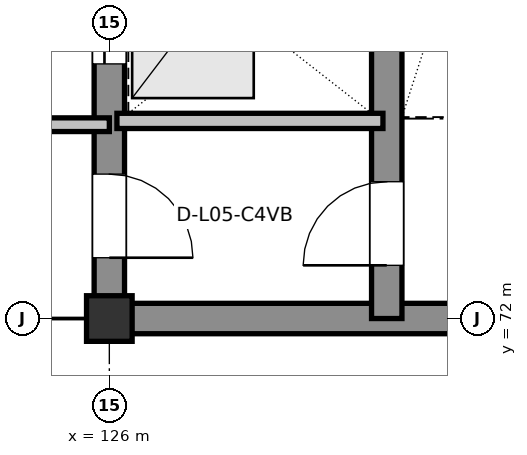
"""IFC4 building model, lengths in metres.
Left out: names, types, materials, properties, quantities, classifications, styles, units other than length and angle.
Written with IfcOpenShell. Run it as: python <this file> out.ifc"""

import sys

from ifc_helpers import new_model, si_unit, direction, frame, frame_2d, origin, origin_2d, place, context, subcontext, project, spatial, rectangle, extrude, element, fill, save


model = new_model("IFC4")
c1 = context("Model", 3, precision=1e-05, world=origin(), true_north=direction((0.0, 1.0)))
c2 = subcontext(c1, "Body", "Model", "MODEL_VIEW")
j1 = project(units=[si_unit("LENGTHUNIT", "METRE"), si_unit("PLANEANGLEUNIT", "RADIAN")], contexts=[c1])
p1 = place(None, origin())
s1 = spatial("IfcSite", under=j1, at=p1, CompositionType="ELEMENT")
p2 = place(p1, origin())
s2 = spatial("IfcBuilding", under=s1, at=p2, CompositionType="ELEMENT")
p3 = place(p2, frame((0.0, 0.0, 23.4)))
s3 = spatial("IfcBuildingStorey", under=s2, at=p3, CompositionType="ELEMENT", Elevation=23.4)
p4 = place(p3, frame((126.0, 72.0, 0.0), z_axis=(0.0, 0.0, 1.0), x_axis=(1.0, 0.0, 0.0)))
e1 = element("IfcColumn", 1, at=p4, inside=s3, PredefinedType="COLUMN", context=c2, shape_type="SweptSolid", body=[
    extrude(rectangle(XDim=0.6, YDim=0.6, at=origin_2d()), origin(), (0.0, 0.0, 1.0), 4.2),
])
p5 = place(p3, frame((126.0, 72.0, 0.0), z_axis=(0.0, 0.0, 1.0), x_axis=(1.0, 0.0, 0.0)))
e2 = element("IfcWall", 2, at=p5, inside=s3, PredefinedType="SHEAR", context=c2, shape_type="SweptSolid", body=[
    extrude(rectangle(XDim=9.0, YDim=0.4, at=frame_2d((4.5, 0.0))), origin(), (0.0, 0.0, 1.0), 3.96),
])
p6 = place(p3, frame((126.0, 90.0, 0.0), z_axis=(0.0, 0.0, 1.0), x_axis=(0.0, -1.0, 0.0)))
e3 = element("IfcWall", 3, at=p6, inside=s3, PredefinedType="SHEAR", context=c2, shape_type="SweptSolid", body=[
    extrude(rectangle(XDim=18.0, YDim=0.4, at=frame_2d((9.0, 0.0))), origin(), (0.0, 0.0, 1.0), 3.96),
])
p7 = place(p6, frame((16.1, 0.0, 0.0)))
e4 = element("IfcOpeningElement", 4, at=p7, cuts=e3, PredefinedType="OPENING", context=c2, shape_type="SweptSolid", body=[
    extrude(rectangle(XDim=1.1, YDim=2.16, at=frame_2d((0.55, 1.08))), frame((0.0, 0.21, 0.0), z_axis=(0.0, -1.0, 0.0), x_axis=(1.0, 0.0, 0.0)), (0.0, 0.0, 1.0), 0.42),
])
p8 = place(p6, frame((13.45, 0.0, 0.0)))
e5 = element("IfcOpeningElement", 5, at=p8, cuts=e3, PredefinedType="OPENING", context=c2, shape_type="SweptSolid", body=[
    extrude(rectangle(XDim=1.2, YDim=2.2, at=frame_2d((0.6, 1.1))), frame((0.0, 0.21, 0.0), z_axis=(0.0, -1.0, 0.0), x_axis=(1.0, 0.0, 0.0)), (0.0, 0.0, 1.0), 0.42),
])
p9 = place(p6, frame((10.65, 0.0, 0.0)))
e6 = element("IfcOpeningElement", 6, at=p9, cuts=e3, PredefinedType="OPENING", context=c2, shape_type="SweptSolid", body=[
    extrude(rectangle(XDim=1.2, YDim=2.2, at=frame_2d((0.6, 1.1))), frame((0.0, 0.21, 0.0), z_axis=(0.0, -1.0, 0.0), x_axis=(1.0, 0.0, 0.0)), (0.0, 0.0, 1.0), 0.42),
])
p10 = place(p6, frame((5.9, 0.0, 0.0)))
e7 = element("IfcOpeningElement", 7, at=p10, cuts=e3, PredefinedType="OPENING", context=c2, shape_type="SweptSolid", body=[
    extrude(rectangle(XDim=1.8, YDim=2.35, at=frame_2d((0.9, 1.175))), frame((0.0, 0.21, 0.0), z_axis=(0.0, -1.0, 0.0), x_axis=(1.0, 0.0, 0.0)), (0.0, 0.0, 1.0), 0.42),
])
p11 = place(p3, frame((129.65, 72.0, 0.0), z_axis=(0.0, 0.0, 1.0), x_axis=(0.0, 1.0, 0.0)))
e8 = element("IfcWall", 8, at=p11, inside=s3, PredefinedType="SHEAR", context=c2, shape_type="SweptSolid", body=[
    extrude(rectangle(XDim=18.0, YDim=0.4, at=frame_2d((9.0, 0.0))), origin(), (0.0, 0.0, 1.0), 3.96),
])
p12 = place(p11, frame((0.7, 0.0, 0.0)))
e9 = element("IfcOpeningElement", 9, at=p12, cuts=e8, PredefinedType="OPENING", context=c2, shape_type="SweptSolid", body=[
    extrude(rectangle(XDim=1.1, YDim=2.16, at=frame_2d((0.55, 1.08))), frame((0.0, 0.21, 0.0), z_axis=(0.0, -1.0, 0.0), x_axis=(1.0, 0.0, 0.0)), (0.0, 0.0, 1.0), 0.42),
])
p13 = place(p3, frame((126.1, 74.6, 0.0), z_axis=(0.0, 0.0, 1.0), x_axis=(1.0, 0.0, 0.0)))
e10 = element("IfcWall", 10, at=p13, inside=s3, PredefinedType="PARTITIONING", context=c2, shape_type="SweptSolid", body=[
    extrude(rectangle(XDim=3.5, YDim=0.2, at=frame_2d((1.75, 0.0))), origin(), (0.0, 0.0, 1.0), 3.96),
])
p14 = place(p3, frame((122.25, 74.55, 0.0), z_axis=(0.0, 0.0, 1.0), x_axis=(1.0, 0.0, 0.0)))
e11 = element("IfcWall", 11, at=p14, inside=s3, PredefinedType="PARTITIONING", context=c2, shape_type="SweptSolid", body=[
    extrude(rectangle(XDim=3.75, YDim=0.18, at=frame_2d((1.875, 0.0))), origin(), (0.0, 0.0, 1.0), 3.96),
])
p15 = place(p12, origin())
e12 = element("IfcDoor", 12, at=p15, inside=s3, OperationType="SINGLE_SWING_LEFT", PredefinedType="DOOR", context=c2, shape_type="SweptSolid", body=[
    extrude(rectangle(XDim=1.1, YDim=2.16, at=frame_2d((0.55, 1.08))), frame((0.0, 0.025, 0.0), z_axis=(0.0, -1.0, 0.0), x_axis=(1.0, 0.0, 0.0)), (0.0, 0.0, 1.0), 0.05),
])
fill(e9, e12)
p16 = place(p7, origin())
e13 = element("IfcDoor", 13, at=p16, inside=s3, OperationType="SINGLE_SWING_RIGHT", PredefinedType="DOOR", context=c2, shape_type="SweptSolid", body=[
    extrude(rectangle(XDim=1.1, YDim=2.16, at=frame_2d((0.55, 1.08))), frame((0.0, 0.025, 0.0), z_axis=(0.0, -1.0, 0.0), x_axis=(1.0, 0.0, 0.0)), (0.0, 0.0, 1.0), 0.05),
])
fill(e4, e13)
p17 = place(p8, origin())
e14 = element("IfcDoor", 14, at=p17, inside=s3, OperationType="SLIDING_TO_LEFT", PredefinedType="DOOR", context=c2, shape_type="SweptSolid", body=[
    extrude(rectangle(XDim=1.2, YDim=2.2, at=frame_2d((0.6, 1.1))), frame((0.0, 0.025, 0.0), z_axis=(0.0, -1.0, 0.0), x_axis=(1.0, 0.0, 0.0)), (0.0, 0.0, 1.0), 0.05),
])
fill(e5, e14)
save(model, sys.argv[1])
